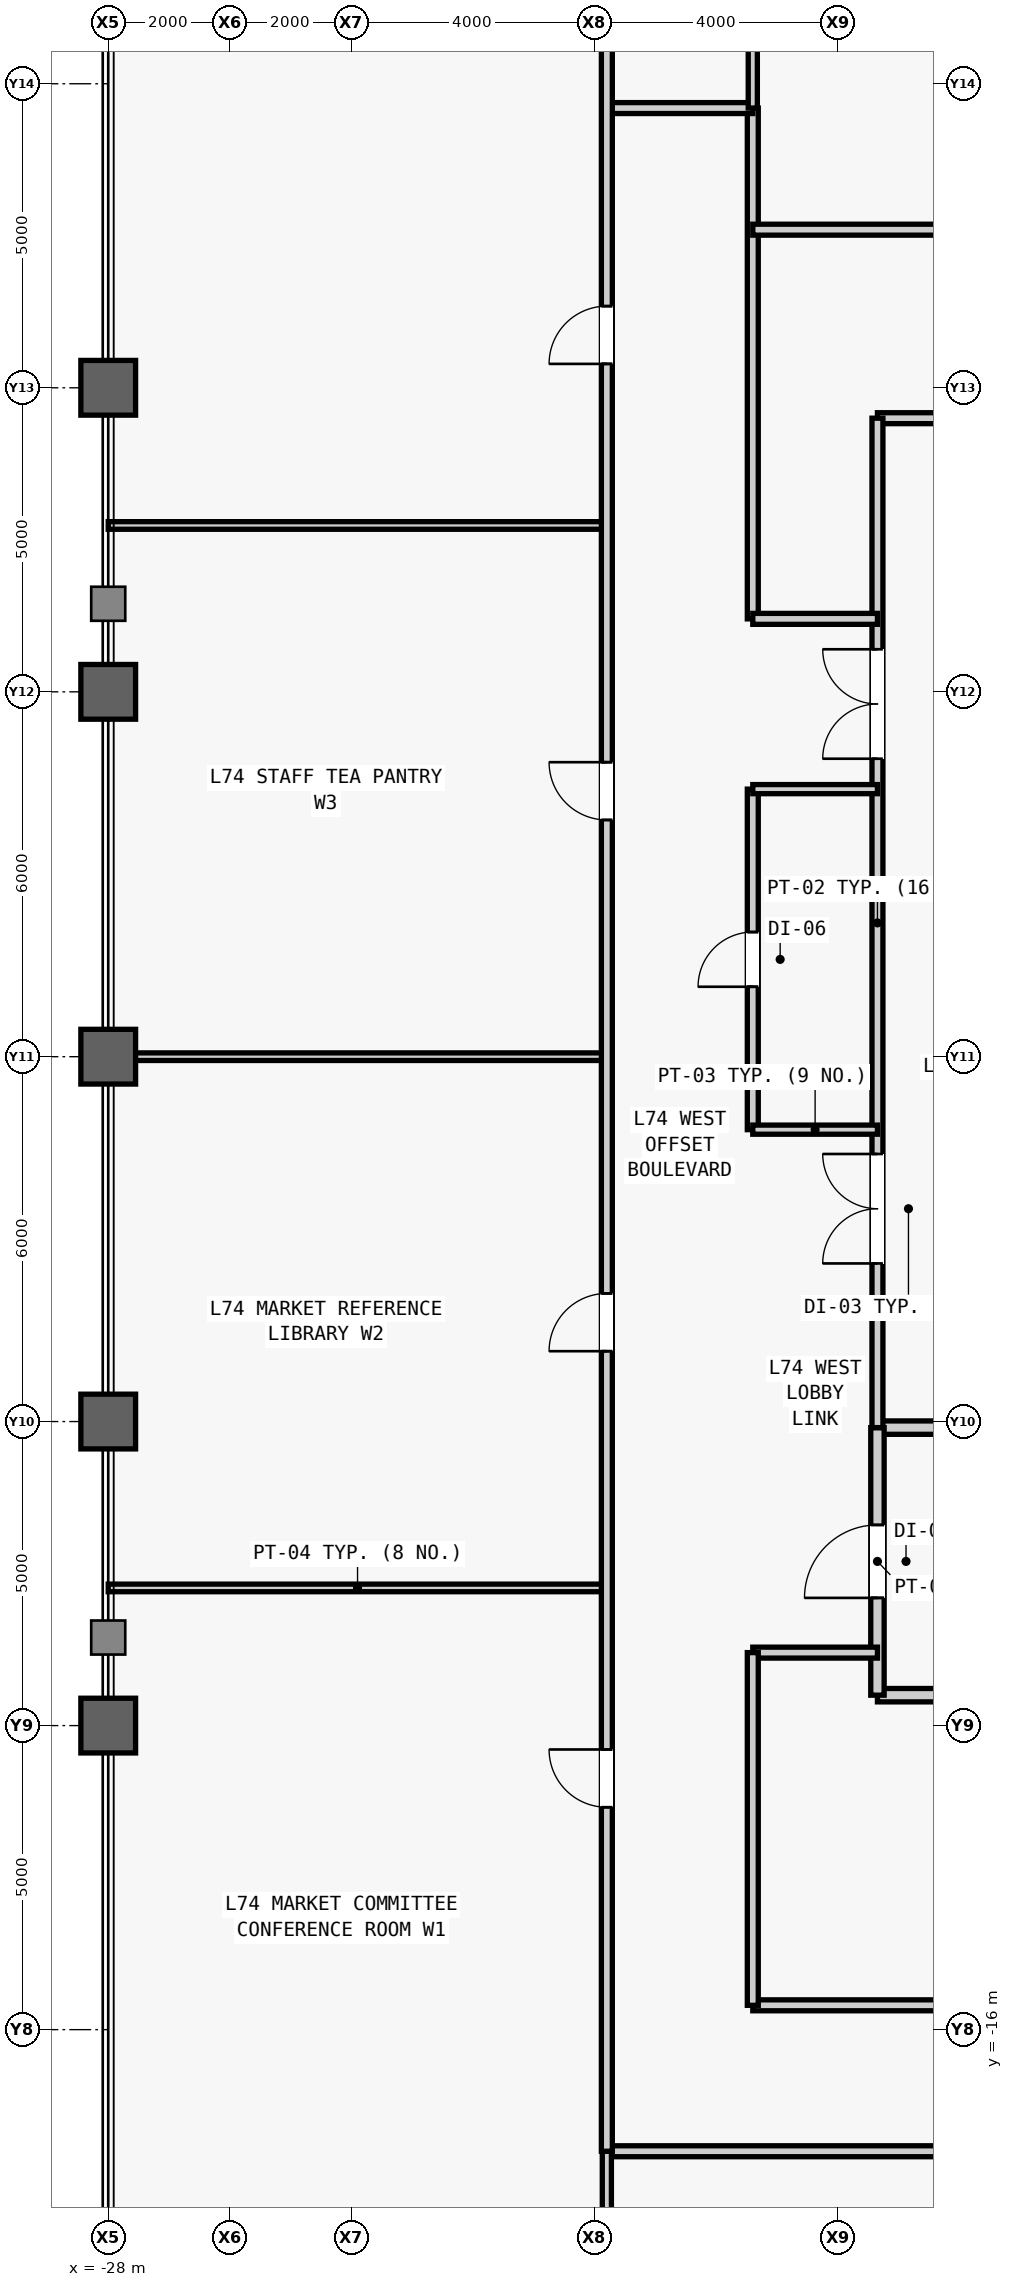
"""IFC4 building model, lengths in metres.
Left out: names, types, materials, properties, quantities, classifications, styles, units other than length and angle.
Written with IfcOpenShell. Run it as: python <this file> out.ifc"""

import sys

from ifc_helpers import new_model, si_unit, direction, frame, frame_2d, origin, origin_2d, place, context, subcontext, project, spatial, rectangle, hollow_rectangle, extrude, source, transform, mapped, element, fill, save


model = new_model("IFC4")
c1 = context("Model", 3, precision=1e-05, world=origin(), true_north=direction((0.0, 1.0)))
c2 = subcontext(c1, "Body", "Model", "MODEL_VIEW")
j1 = project(units=[si_unit("LENGTHUNIT", "METRE"), si_unit("PLANEANGLEUNIT", "RADIAN")], contexts=[c1])
p1 = place(None, origin())
s1 = spatial("IfcSite", under=j1, at=p1, CompositionType="ELEMENT")
p2 = place(p1, origin())
s2 = spatial("IfcBuilding", under=s1, at=p2, CompositionType="ELEMENT")
p3 = place(p2, frame((0.0, 0.0, 313.5)))
s3 = spatial("IfcBuildingStorey", under=s2, at=p3, CompositionType="ELEMENT", Elevation=313.5)
m1 = source(origin(), c2, "Body", "SweptSolid", [
    extrude(hollow_rectangle(XDim=0.9, YDim=0.9, WallThickness=0.05, at=origin_2d()), origin(), (0.0, 0.0, 1.0), 4.0),
])
for number, where, z_axis, x_axis in (
    (1, (-28.0, -11.0, 0.0), (0.0, 0.0, 1.0), (1.0, 0.0, 0.0)),
    (2, (-28.0, -6.0, 0.0), (0.0, 0.0, 1.0), (1.0, 0.0, 0.0)),
    (3, (-28.0, 0.0, 0.0), (0.0, 0.0, 1.0), (1.0, 0.0, 0.0)),
    (4, (-28.0, 6.0, 0.0), (0.0, 0.0, 1.0), (1.0, 0.0, 0.0)),
    (5, (-28.0, 11.0, 0.0), (0.0, 0.0, 1.0), (1.0, 0.0, 0.0)),
):
    element("IfcColumn", number, at=place(p3, frame(where, z_axis=z_axis, x_axis=x_axis)), inside=s3, PredefinedType="COLUMN", context=c2, shape_type="MappedRepresentation", body=[
        mapped(m1, transform((0.0, 0.0, 0.0), scale=1.0)),
    ])
m2 = source(origin(), c2, "Body", "SweptSolid", [
    extrude(rectangle(XDim=4.05, YDim=0.22, at=frame_2d((2.025, 0.0))), origin(), (0.0, 0.0, 1.0), 3.78),
])
p4 = place(p3, frame((-15.35, -10.5, 0.0), z_axis=(0.0, 0.0, 1.0), x_axis=(1.0, 0.0, 0.0)))
e6 = element("IfcWall", 6, at=p4, inside=s3, PredefinedType="PARTITIONING", context=c2, shape_type="MappedRepresentation", body=[
    mapped(m2, transform((0.0, 0.0, 0.0), scale=1.0)),
])
m3 = source(origin(), c2, "Body", "SweptSolid", [
    extrude(rectangle(XDim=4.05, YDim=0.22, at=frame_2d((2.025, 0.0))), origin(), (0.0, 0.0, 1.0), 3.085),
])
p5 = place(p3, frame((-15.35, -6.1, 0.0), z_axis=(0.0, 0.0, 1.0), x_axis=(1.0, 0.0, 0.0)))
e7 = element("IfcWall", 7, at=p5, inside=s3, PredefinedType="PARTITIONING", context=c2, shape_type="MappedRepresentation", body=[
    mapped(m3, transform((0.0, 0.0, 0.0), scale=1.0)),
])
m4 = source(origin(), c2, "Body", "SweptSolid", [
    extrude(rectangle(XDim=4.4, YDim=0.22, at=frame_2d((2.2, 0.0))), origin(), (0.0, 0.0, 1.0), 3.78),
])
p6 = place(p3, frame((-15.35, -10.5, 0.0), z_axis=(0.0, 0.0, 1.0), x_axis=(0.0, 1.0, 0.0)))
e8 = element("IfcWall", 8, at=p6, inside=s3, PredefinedType="PARTITIONING", context=c2, shape_type="MappedRepresentation", body=[
    mapped(m4, transform((0.0, 0.0, 0.0), scale=1.0)),
])
m5 = source(origin(), c2, "Body", "SweptSolid", [
    extrude(rectangle(XDim=1.2, YDim=2.2, at=frame_2d((0.6, 1.1))), frame((0.0, 0.12, 0.0), z_axis=(0.0, -1.0, 0.0), x_axis=(1.0, 0.0, 0.0)), (0.0, 0.0, 1.0), 0.24),
])
p7 = place(p6, frame((1.6, 0.0, 0.0)))
e9 = element("IfcOpeningElement", 9, at=p7, cuts=e8, PredefinedType="OPENING", context=c2, shape_type="MappedRepresentation", body=[
    mapped(m5, transform((0.0, 0.0, 0.0), scale=1.0)),
])
m6 = source(origin(), c2, "Body", "SweptSolid", [
    extrude(rectangle(XDim=4.05, YDim=0.18, at=frame_2d((2.025, 0.0))), origin(), (0.0, 0.0, 1.0), 3.78),
])
p8 = place(p3, frame((-15.35, 10.5, 0.0), z_axis=(0.0, 0.0, 1.0), x_axis=(1.0, 0.0, 0.0)))
e10 = element("IfcWall", 10, at=p8, inside=s3, PredefinedType="PARTITIONING", context=c2, shape_type="MappedRepresentation", body=[
    mapped(m6, transform((0.0, 0.0, 0.0), scale=1.0)),
])
m7 = source(origin(), c2, "Body", "SweptSolid", [
    extrude(rectangle(XDim=16.6, YDim=0.18, at=frame_2d((8.3, 0.0))), origin(), (0.0, 0.0, 1.0), 3.78),
])
p9 = place(p3, frame((-15.35, -6.1, 0.0), z_axis=(0.0, 0.0, 1.0), x_axis=(0.0, 1.0, 0.0)))
e11 = element("IfcWall", 11, at=p9, inside=s3, PredefinedType="PARTITIONING", context=c2, shape_type="MappedRepresentation", body=[
    mapped(m7, transform((0.0, 0.0, 0.0), scale=1.0)),
])
m8 = source(origin(), c2, "Body", "SweptSolid", [
    extrude(rectangle(XDim=1.8, YDim=2.25, at=frame_2d((0.9, 1.125))), frame((0.0, 0.1, 0.0), z_axis=(0.0, -1.0, 0.0), x_axis=(1.0, 0.0, 0.0)), (0.0, 0.0, 1.0), 0.2),
])
p10 = place(p9, frame((2.7, 0.0, 0.0)))
e12 = element("IfcOpeningElement", 12, at=p10, cuts=e11, PredefinedType="OPENING", context=c2, shape_type="MappedRepresentation", body=[
    mapped(m8, transform((0.0, 0.0, 0.0), scale=1.0)),
])
p11 = place(p9, frame((11.0, 0.0, 0.0)))
e13 = element("IfcOpeningElement", 13, at=p11, cuts=e11, PredefinedType="OPENING", context=c2, shape_type="MappedRepresentation", body=[
    mapped(m8, transform((0.0, 0.0, 0.0), scale=1.0)),
])
m9 = source(origin(), c2, "Body", "SweptSolid", [
    extrude(rectangle(XDim=5.6, YDim=0.18, at=frame_2d((2.8, 0.0))), origin(), (0.0, 0.0, 1.0), 3.78),
])
p12 = place(p3, frame((-17.4, -1.2, 0.0), z_axis=(0.0, 0.0, 1.0), x_axis=(0.0, 1.0, 0.0)))
e14 = element("IfcWall", 14, at=p12, inside=s3, PredefinedType="PARTITIONING", context=c2, shape_type="MappedRepresentation", body=[
    mapped(m9, transform((0.0, 0.0, 0.0), scale=1.0)),
])
m10 = source(origin(), c2, "Body", "SweptSolid", [
    extrude(rectangle(XDim=0.9, YDim=2.15, at=frame_2d((0.45, 1.075))), frame((0.0, 0.1, 0.0), z_axis=(0.0, -1.0, 0.0), x_axis=(1.0, 0.0, 0.0)), (0.0, 0.0, 1.0), 0.2),
])
p13 = place(p12, frame((2.35, 0.0, 0.0)))
e15 = element("IfcOpeningElement", 15, at=p13, cuts=e14, PredefinedType="OPENING", context=c2, shape_type="MappedRepresentation", body=[
    mapped(m10, transform((0.0, 0.0, 0.0), scale=1.0)),
])
m11 = source(origin(), c2, "Body", "SweptSolid", [
    extrude(rectangle(XDim=2.05, YDim=0.15, at=frame_2d((1.025, 0.0))), origin(), (0.0, 0.0, 1.0), 3.78),
])
for number, where, z_axis, x_axis in (
    (16, (-17.4, -1.2, 0.0), (0.0, 0.0, 1.0), (1.0, 0.0, 0.0)),
    (17, (-17.4, 4.4, 0.0), (0.0, 0.0, 1.0), (1.0, 0.0, 0.0)),
):
    element("IfcWall", number, at=place(p3, frame(where, z_axis=z_axis, x_axis=x_axis)), inside=s3, PredefinedType="PARTITIONING", context=c2, shape_type="MappedRepresentation", body=[
        mapped(m11, transform((0.0, 0.0, 0.0), scale=1.0)),
    ])
m12 = source(origin(), c2, "Body", "SweptSolid", [
    extrude(rectangle(XDim=2.05, YDim=0.18, at=frame_2d((1.025, 0.0))), origin(), (0.0, 0.0, 1.0), 3.78),
])
p14 = place(p3, frame((-17.4, -9.8, 0.0), z_axis=(0.0, 0.0, 1.0), x_axis=(1.0, 0.0, 0.0)))
e18 = element("IfcWall", 18, at=p14, inside=s3, PredefinedType="PARTITIONING", context=c2, shape_type="MappedRepresentation", body=[
    mapped(m12, transform((0.0, 0.0, 0.0), scale=1.0)),
])
m13 = source(origin(), c2, "Body", "SweptSolid", [
    extrude(rectangle(XDim=8.4, YDim=0.18, at=frame_2d((4.2, 0.0))), origin(), (0.0, 0.0, 1.0), 3.78),
])
p15 = place(p3, frame((-17.4, 7.2, 0.0), z_axis=(0.0, 0.0, 1.0), x_axis=(0.0, 1.0, 0.0)))
e19 = element("IfcWall", 19, at=p15, inside=s3, PredefinedType="PARTITIONING", context=c2, shape_type="MappedRepresentation", body=[
    mapped(m13, transform((0.0, 0.0, 0.0), scale=1.0)),
])
p16 = place(p3, frame((-17.4, 7.2, 0.0), z_axis=(0.0, 0.0, 1.0), x_axis=(1.0, 0.0, 0.0)))
e20 = element("IfcWall", 20, at=p16, inside=s3, PredefinedType="PARTITIONING", context=c2, shape_type="MappedRepresentation", body=[
    mapped(m12, transform((0.0, 0.0, 0.0), scale=1.0)),
])
m14 = source(origin(), c2, "Body", "SweptSolid", [
    extrude(rectangle(XDim=16.1, YDim=0.18, at=frame_2d((8.05, 0.0))), origin(), (0.0, 0.0, 1.0), 3.78),
])
p17 = place(p3, frame((-17.4, -15.6, 0.0), z_axis=(0.0, 0.0, 1.0), x_axis=(1.0, 0.0, 0.0)))
e21 = element("IfcWall", 21, at=p17, inside=s3, PredefinedType="PARTITIONING", context=c2, shape_type="MappedRepresentation", body=[
    mapped(m14, transform((0.0, 0.0, 0.0), scale=1.0)),
])
p18 = place(p17, frame((8.95, 0.0, 0.0)))
e22 = element("IfcOpeningElement", 22, at=p18, cuts=e21, PredefinedType="OPENING", context=c2, shape_type="MappedRepresentation", body=[
    mapped(m10, transform((0.0, 0.0, 0.0), scale=1.0)),
])
m15 = source(origin(), c2, "Body", "SweptSolid", [
    extrude(rectangle(XDim=5.8, YDim=0.18, at=frame_2d((2.9, 0.0))), origin(), (0.0, 0.0, 1.0), 3.78),
])
p19 = place(p3, frame((-17.4, -15.6, 0.0), z_axis=(0.0, 0.0, 1.0), x_axis=(0.0, 1.0, 0.0)))
e23 = element("IfcWall", 23, at=p19, inside=s3, PredefinedType="PARTITIONING", context=c2, shape_type="MappedRepresentation", body=[
    mapped(m15, transform((0.0, 0.0, 0.0), scale=1.0)),
])
m16 = source(origin(), c2, "Body", "SweptSolid", [
    extrude(rectangle(XDim=2.4, YDim=0.18, at=frame_2d((1.2, 0.0))), origin(), (0.0, 0.0, 1.0), 3.78),
])
p20 = place(p3, frame((-19.8, 15.6, 0.0), z_axis=(0.0, 0.0, 1.0), x_axis=(1.0, 0.0, 0.0)))
e24 = element("IfcWall", 24, at=p20, inside=s3, PredefinedType="PARTITIONING", context=c2, shape_type="MappedRepresentation", body=[
    mapped(m16, transform((0.0, 0.0, 0.0), scale=1.0)),
])
m17 = source(origin(), c2, "Body", "SweptSolid", [
    extrude(rectangle(XDim=37.55, YDim=0.18, at=frame_2d((18.775, 0.0))), origin(), (0.0, 0.0, 1.0), 3.78),
])
p21 = place(p3, frame((-19.8, -18.0, 0.0), z_axis=(0.0, 0.0, 1.0), x_axis=(1.0, 0.0, 0.0)))
e25 = element("IfcWall", 25, at=p21, inside=s3, PredefinedType="PARTITIONING", context=c2, shape_type="MappedRepresentation", body=[
    mapped(m17, transform((0.0, 0.0, 0.0), scale=1.0)),
])
m18 = source(origin(), c2, "Body", "SweptSolid", [
    extrude(rectangle(XDim=1.05, YDim=2.2, at=frame_2d((0.525, 1.1))), frame((0.0, 0.1, 0.0), z_axis=(0.0, -1.0, 0.0), x_axis=(1.0, 0.0, 0.0)), (0.0, 0.0, 1.0), 0.2),
])
p22 = place(p21, frame((5.983, 0.0, 0.0)))
e26 = element("IfcOpeningElement", 26, at=p22, cuts=e25, PredefinedType="OPENING", context=c2, shape_type="MappedRepresentation", body=[
    mapped(m18, transform((0.0, 0.0, 0.0), scale=1.0)),
])
p23 = place(p21, frame((17.875, 0.0, 0.0)))
e27 = element("IfcOpeningElement", 27, at=p23, cuts=e25, PredefinedType="OPENING", context=c2, shape_type="MappedRepresentation", body=[
    mapped(m18, transform((0.0, 0.0, 0.0), scale=1.0)),
])
p24 = place(p21, frame((30.116, 0.0, 0.0)))
e28 = element("IfcOpeningElement", 28, at=p24, cuts=e25, PredefinedType="OPENING", context=c2, shape_type="MappedRepresentation", body=[
    mapped(m18, transform((0.0, 0.0, 0.0), scale=1.0)),
])
m19 = source(origin(), c2, "Body", "SweptSolid", [
    extrude(rectangle(XDim=10.0, YDim=0.15, at=frame_2d((5.0, 0.0))), origin(), (0.0, 0.0, 1.0), 3.164),
])
p25 = place(p3, frame((-19.8, -28.0, 0.0), z_axis=(0.0, 0.0, 1.0), x_axis=(0.0, 1.0, 0.0)))
e29 = element("IfcWall", 29, at=p25, inside=s3, PredefinedType="PARTITIONING", context=c2, shape_type="MappedRepresentation", body=[
    mapped(m19, transform((0.0, 0.0, 0.0), scale=1.0)),
])
m20 = source(origin(), c2, "Body", "SweptSolid", [
    extrude(rectangle(XDim=32.75, YDim=0.18, at=frame_2d((16.375, 0.0))), origin(), (0.0, 0.0, 1.0), 3.78),
])
p26 = place(p3, frame((-17.4, 13.6, 0.0), z_axis=(0.0, 0.0, 1.0), x_axis=(1.0, 0.0, 0.0)))
e30 = element("IfcWall", 30, at=p26, inside=s3, PredefinedType="PARTITIONING", context=c2, shape_type="MappedRepresentation", body=[
    mapped(m20, transform((0.0, 0.0, 0.0), scale=1.0)),
])
p27 = place(p26, frame((27.075, 0.0, 0.0)))
e31 = element("IfcOpeningElement", 31, at=p27, cuts=e30, PredefinedType="OPENING", context=c2, shape_type="MappedRepresentation", body=[
    mapped(m18, transform((0.0, 0.0, 0.0), scale=1.0)),
])
m21 = source(origin(), c2, "Body", "SweptSolid", [
    extrude(rectangle(XDim=12.4, YDim=0.15, at=frame_2d((6.2, 0.0))), origin(), (0.0, 0.0, 1.0), 3.78),
])
p28 = place(p3, frame((-17.4, 15.6, 0.0), z_axis=(0.0, 0.0, 1.0), x_axis=(0.0, 1.0, 0.0)))
e32 = element("IfcWall", 32, at=p28, inside=s3, PredefinedType="PARTITIONING", context=c2, shape_type="MappedRepresentation", body=[
    mapped(m21, transform((0.0, 0.0, 0.0), scale=1.0)),
])
m22 = source(origin(), c2, "Body", "SweptSolid", [
    extrude(rectangle(XDim=8.2, YDim=0.125, at=frame_2d((4.1, 0.0))), origin(), (0.0, 0.0, 1.0), 3.78),
])
p29 = place(p3, frame((-28.0, -8.736, 0.0), z_axis=(0.0, 0.0, 1.0), x_axis=(1.0, 0.0, 0.0)))
e33 = element("IfcWall", 33, at=p29, inside=s3, PredefinedType="PARTITIONING", context=c2, shape_type="MappedRepresentation", body=[
    mapped(m22, transform((0.0, 0.0, 0.0), scale=1.0)),
])
m23 = source(origin(), c2, "Body", "SweptSolid", [
    extrude(rectangle(XDim=8.2, YDim=0.125, at=frame_2d((4.1, 0.0))), origin(), (0.0, 0.0, 1.0), 3.085),
])
p30 = place(p3, frame((-28.0, 0.0, 0.0), z_axis=(0.0, 0.0, 1.0), x_axis=(1.0, 0.0, 0.0)))
e34 = element("IfcWall", 34, at=p30, inside=s3, PredefinedType="PARTITIONING", context=c2, shape_type="MappedRepresentation", body=[
    mapped(m23, transform((0.0, 0.0, 0.0), scale=1.0)),
])
p31 = place(p3, frame((-28.0, 8.736, 0.0), z_axis=(0.0, 0.0, 1.0), x_axis=(1.0, 0.0, 0.0)))
e35 = element("IfcWall", 35, at=p31, inside=s3, PredefinedType="PARTITIONING", context=c2, shape_type="MappedRepresentation", body=[
    mapped(m22, transform((0.0, 0.0, 0.0), scale=1.0)),
])
m24 = source(origin(), c2, "Body", "SweptSolid", [
    extrude(rectangle(XDim=40.5, YDim=0.18, at=frame_2d((20.25, 0.0))), origin(), (0.0, 0.0, 1.0), 3.164),
])
p32 = place(p3, frame((-19.8, -18.0, 0.0), z_axis=(0.0, 0.0, 1.0), x_axis=(0.0, 1.0, 0.0)))
e36 = element("IfcWall", 36, at=p32, inside=s3, PredefinedType="PARTITIONING", context=c2, shape_type="MappedRepresentation", body=[
    mapped(m24, transform((0.0, 0.0, 0.0), scale=1.0)),
])
m25 = source(origin(), c2, "Body", "SweptSolid", [
    extrude(rectangle(XDim=0.95, YDim=2.15, at=frame_2d((0.475, 1.075))), frame((0.0, 0.1, 0.0), z_axis=(0.0, -1.0, 0.0), x_axis=(1.0, 0.0, 0.0)), (0.0, 0.0, 1.0), 0.2),
])
p33 = place(p32, frame((5.657, 0.0, 0.0)))
e37 = element("IfcOpeningElement", 37, at=p33, cuts=e36, PredefinedType="OPENING", context=c2, shape_type="MappedRepresentation", body=[
    mapped(m25, transform((0.0, 0.0, 0.0), scale=1.0)),
])
p34 = place(p32, frame((13.157, 0.0, 0.0)))
e38 = element("IfcOpeningElement", 38, at=p34, cuts=e36, PredefinedType="OPENING", context=c2, shape_type="MappedRepresentation", body=[
    mapped(m25, transform((0.0, 0.0, 0.0), scale=1.0)),
])
p35 = place(p32, frame((21.893, 0.0, 0.0)))
e39 = element("IfcOpeningElement", 39, at=p35, cuts=e36, PredefinedType="OPENING", context=c2, shape_type="MappedRepresentation", body=[
    mapped(m25, transform((0.0, 0.0, 0.0), scale=1.0)),
])
p36 = place(p32, frame((29.393, 0.0, 0.0)))
e40 = element("IfcOpeningElement", 40, at=p36, cuts=e36, PredefinedType="OPENING", context=c2, shape_type="MappedRepresentation", body=[
    mapped(m25, transform((0.0, 0.0, 0.0), scale=1.0)),
])
m26 = source(origin(), c2, "Body", "SweptSolid", [
    extrude(rectangle(XDim=1.2, YDim=2.2, at=frame_2d((0.6, 1.1))), frame((0.0, 0.025, 0.0), z_axis=(0.0, -1.0, 0.0), x_axis=(1.0, 0.0, 0.0)), (0.0, 0.0, 1.0), 0.05),
])
p37 = place(p7, origin())
e41 = element("IfcDoor", 41, at=p37, inside=s3, OperationType="SINGLE_SWING_LEFT", PredefinedType="DOOR", context=c2, shape_type="MappedRepresentation", body=[
    mapped(m26, transform((0.0, 0.0, 0.0), scale=1.0)),
])
fill(e9, e41)
m27 = source(origin(), c2, "Body", "SweptSolid", [
    extrude(rectangle(XDim=1.8, YDim=2.25, at=frame_2d((0.9, 1.125))), frame((0.0, 0.025, 0.0), z_axis=(0.0, -1.0, 0.0), x_axis=(1.0, 0.0, 0.0)), (0.0, 0.0, 1.0), 0.05),
])
p38 = place(p10, origin())
e42 = element("IfcDoor", 42, at=p38, inside=s3, OperationType="SINGLE_SWING_LEFT", PredefinedType="DOOR", context=c2, shape_type="MappedRepresentation", body=[
    mapped(m27, transform((0.0, 0.0, 0.0), scale=1.0)),
])
fill(e12, e42)
p39 = place(p11, origin())
e43 = element("IfcDoor", 43, at=p39, inside=s3, OperationType="SINGLE_SWING_RIGHT", PredefinedType="DOOR", context=c2, shape_type="MappedRepresentation", body=[
    mapped(m27, transform((0.0, 0.0, 0.0), scale=1.0)),
])
fill(e13, e43)
m28 = source(origin(), c2, "Body", "SweptSolid", [
    extrude(rectangle(XDim=0.9, YDim=2.15, at=frame_2d((0.45, 1.075))), frame((0.0, 0.025, 0.0), z_axis=(0.0, -1.0, 0.0), x_axis=(1.0, 0.0, 0.0)), (0.0, 0.0, 1.0), 0.05),
])
p40 = place(p13, origin())
e44 = element("IfcDoor", 44, at=p40, inside=s3, OperationType="SINGLE_SWING_LEFT", PredefinedType="DOOR", context=c2, shape_type="MappedRepresentation", body=[
    mapped(m28, transform((0.0, 0.0, 0.0), scale=1.0)),
])
fill(e15, e44)
m29 = source(origin(), c2, "Body", "SweptSolid", [
    extrude(rectangle(XDim=0.95, YDim=2.15, at=frame_2d((0.475, 1.075))), frame((0.0, 0.025, 0.0), z_axis=(0.0, -1.0, 0.0), x_axis=(1.0, 0.0, 0.0)), (0.0, 0.0, 1.0), 0.05),
])
p41 = place(p33, origin())
e45 = element("IfcDoor", 45, at=p41, inside=s3, OperationType="SINGLE_SWING_RIGHT", PredefinedType="DOOR", context=c2, shape_type="MappedRepresentation", body=[
    mapped(m29, transform((0.0, 0.0, 0.0), scale=1.0)),
])
fill(e37, e45)
p42 = place(p34, origin())
e46 = element("IfcDoor", 46, at=p42, inside=s3, OperationType="SINGLE_SWING_LEFT", PredefinedType="DOOR", context=c2, shape_type="MappedRepresentation", body=[
    mapped(m29, transform((0.0, 0.0, 0.0), scale=1.0)),
])
fill(e38, e46)
p43 = place(p35, origin())
e47 = element("IfcDoor", 47, at=p43, inside=s3, OperationType="SINGLE_SWING_RIGHT", PredefinedType="DOOR", context=c2, shape_type="MappedRepresentation", body=[
    mapped(m29, transform((0.0, 0.0, 0.0), scale=1.0)),
])
fill(e39, e47)
p44 = place(p36, origin())
e48 = element("IfcDoor", 48, at=p44, inside=s3, OperationType="SINGLE_SWING_LEFT", PredefinedType="DOOR", context=c2, shape_type="MappedRepresentation", body=[
    mapped(m29, transform((0.0, 0.0, 0.0), scale=1.0)),
])
fill(e40, e48)
save(model, sys.argv[1])
